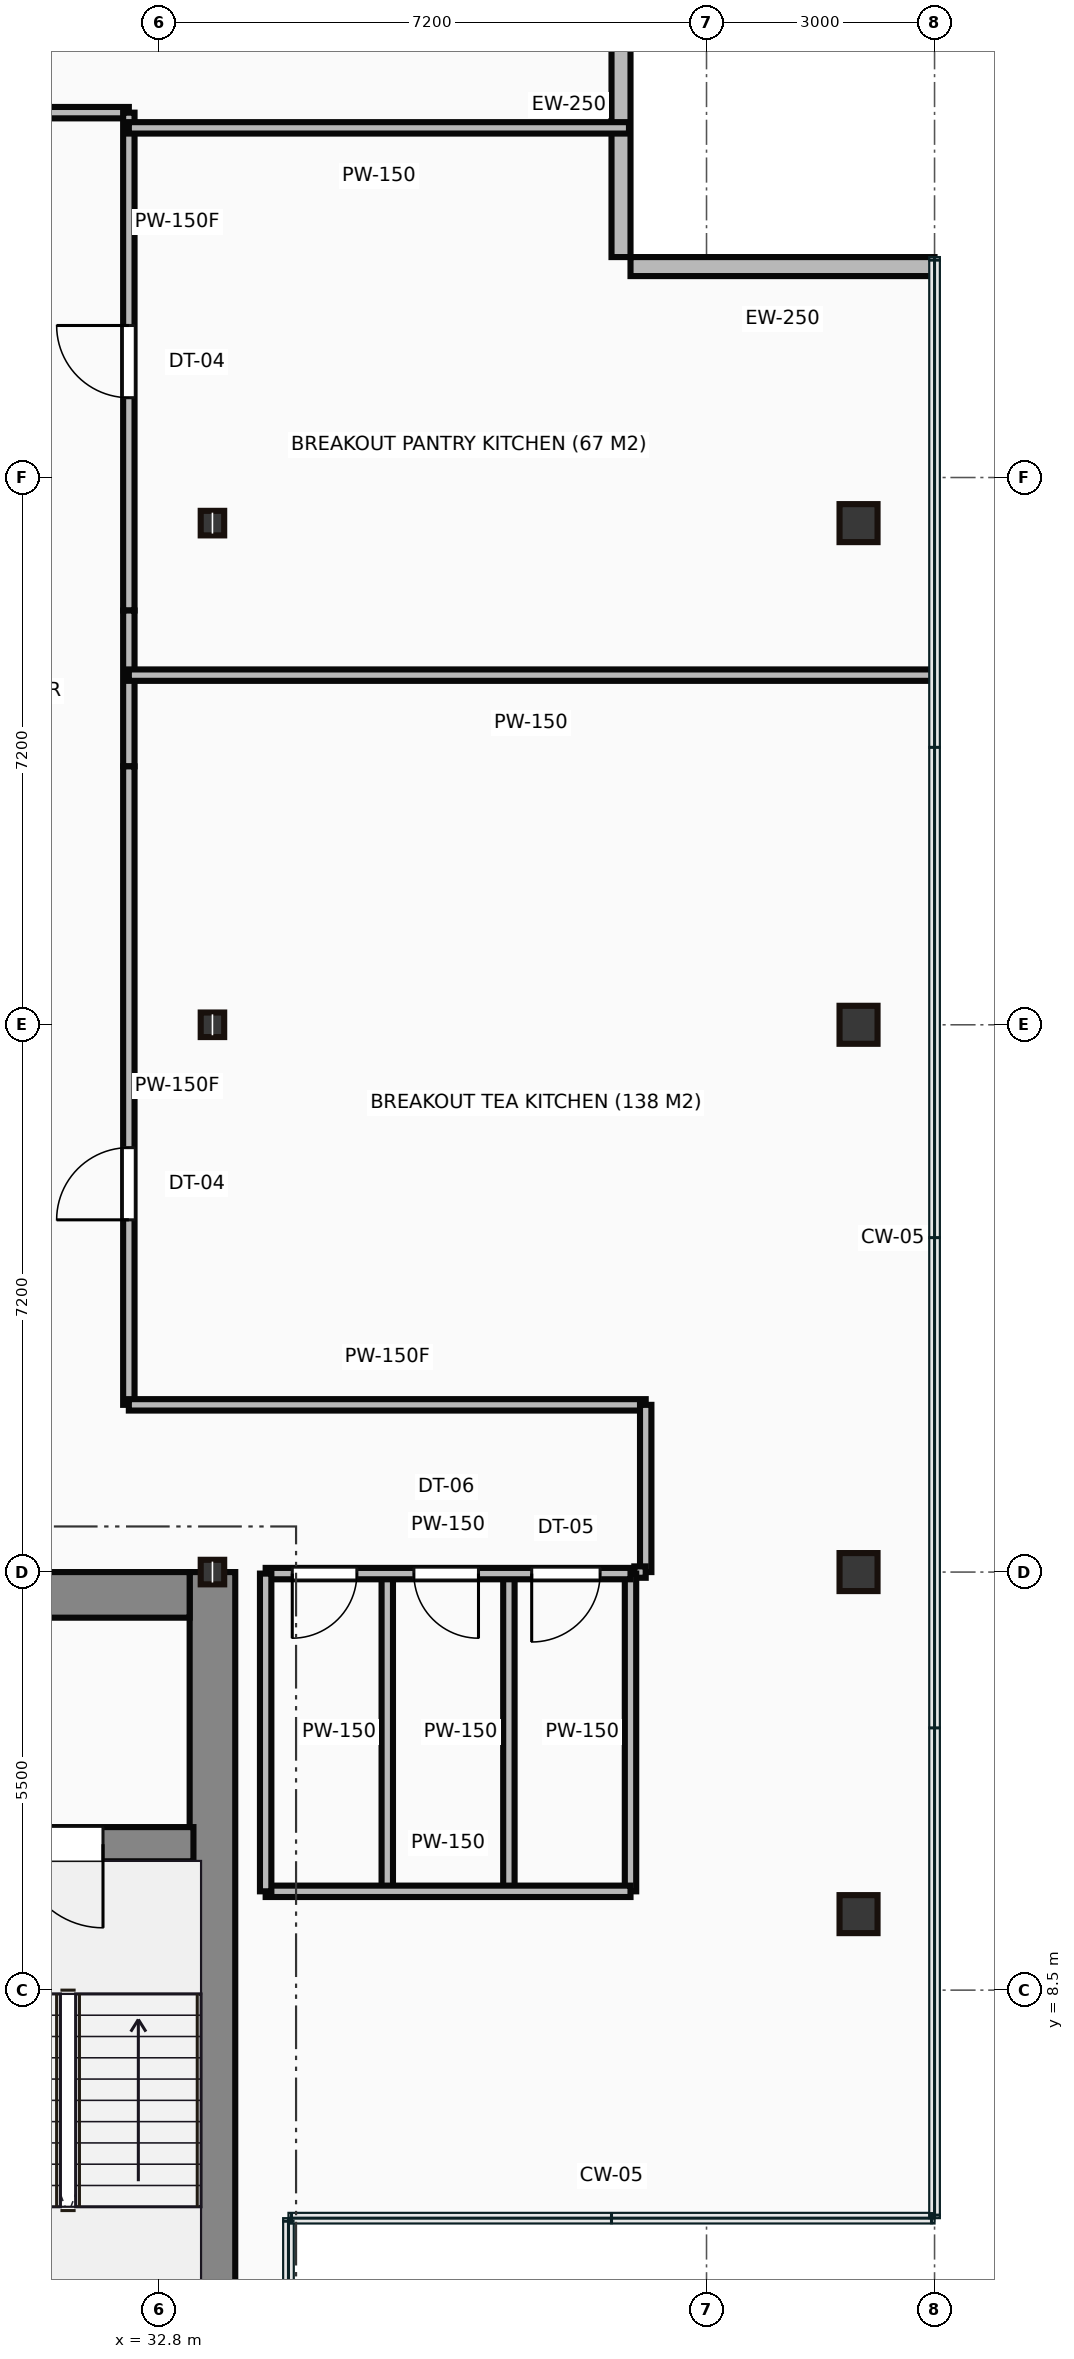
"""IFC4 building model, lengths in metres.
Left out: names, types, materials, properties, quantities, classifications, styles, units other than length and angle.
Written with IfcOpenShell. Run it as: python <this file> out.ifc"""

import sys

from ifc_helpers import new_model, si_unit, direction, frame, frame_2d, origin, origin_2d, place, context, subcontext, project, spatial, rectangle, hollow_rectangle, i_section, extrude, source, transform, mapped, element, fill, save


model = new_model("IFC4")
c1 = context("Model", 3, precision=1e-05, world=origin(), true_north=direction((0.0, 1.0)))
c2 = subcontext(c1, "Body", "Model", "MODEL_VIEW")
j1 = project(units=[si_unit("LENGTHUNIT", "METRE"), si_unit("PLANEANGLEUNIT", "RADIAN")], contexts=[c1])
p1 = place(None, origin())
s1 = spatial("IfcSite", under=j1, at=p1, CompositionType="ELEMENT")
p2 = place(p1, origin())
s2 = spatial("IfcBuilding", under=s1, at=p2, CompositionType="ELEMENT")
p3 = place(p2, frame((0.0, 0.0, 221.45)))
s3 = spatial("IfcBuildingStorey", under=s2, at=p3, CompositionType="ELEMENT", Elevation=221.45)
m1 = source(origin(), c2, "Body", "SweptSolid", [
    extrude(rectangle(XDim=13.1, YDim=0.6, at=frame_2d((6.55, 0.0))), origin(), (0.0, 0.0, 1.0), 3.65),
])
p4 = place(p3, frame((33.5, 0.9, 0.0), z_axis=(0.0, 0.0, 1.0), x_axis=(0.0, 1.0, 0.0)))
e1 = element("IfcWall", 1, at=p4, inside=s3, PredefinedType="SHEAR", context=c2, shape_type="MappedRepresentation", body=[
    mapped(m1, transform((0.0, 0.0, 0.0))),
])
m2 = source(origin(), c2, "Body", "SweptSolid", [
    extrude(rectangle(XDim=12.6, YDim=0.6, at=frame_2d((6.3, 0.0))), origin(), (0.0, 0.0, 1.0), 3.65),
])
p5 = place(p3, frame((20.6, 13.7, 0.0), z_axis=(0.0, 0.0, 1.0), x_axis=(1.0, 0.0, 0.0)))
e2 = element("IfcWall", 2, at=p5, inside=s3, PredefinedType="SHEAR", context=c2, shape_type="MappedRepresentation", body=[
    mapped(m2, transform((0.0, 0.0, 0.0))),
])
p6 = place(p5, frame((9.25, 0.0, 0.0)))
e3 = element("IfcOpeningElement", 3, at=p6, cuts=e2, PredefinedType="OPENING", context=c2, shape_type="SweptSolid", body=[
    extrude(rectangle(XDim=1.1, YDim=2.15, at=frame_2d((0.55, 1.075))), frame((0.0, 0.31, 0.0), z_axis=(0.0, -1.0, 0.0), x_axis=(1.0, 0.0, 0.0)), (0.0, 0.0, 1.0), 0.62),
])
m3 = source(origin(), c2, "Body", "SweptSolid", [
    extrude(rectangle(XDim=3.39, YDim=0.45, at=frame_2d((1.695, 0.0))), origin(), (0.0, 0.0, 1.0), 3.65),
])
p7 = place(p3, frame((29.86, 10.42, 0.0), z_axis=(0.0, 0.0, 1.0), x_axis=(1.0, 0.0, 0.0)))
e4 = element("IfcWall", 4, at=p7, inside=s3, PredefinedType="SHEAR", context=c2, shape_type="MappedRepresentation", body=[
    mapped(m3, transform((0.0, 0.0, 0.0))),
])
p8 = place(p7, frame((1.1, 0.0, 0.0)))
e5 = element("IfcOpeningElement", 5, at=p8, cuts=e4, PredefinedType="OPENING", context=c2, shape_type="SweptSolid", body=[
    extrude(rectangle(XDim=1.1, YDim=2.15, at=frame_2d((0.55, 1.075))), frame((0.0, 0.235, 0.0), z_axis=(0.0, -1.0, 0.0), x_axis=(1.0, 0.0, 0.0)), (0.0, 0.0, 1.0), 0.47),
])
m4 = source(origin(), c2, "Body", "SweptSolid", [
    extrude(i_section(OverallWidth=0.309, OverallDepth=0.323, WebThickness=0.014, FlangeThickness=0.023, at=origin_2d()), origin(), (0.0, 0.0, 1.0), 3.65),
])
for number, where, z_axis, x_axis in (
    (6, (33.5, 14.0, 0.0), (0.0, 0.0, 1.0), (1.0, 0.0, 0.0)),
    (7, (33.5, 21.2, 0.0), (0.0, 0.0, 1.0), (1.0, 0.0, 0.0)),
    (8, (33.5, 27.8, 0.0), (0.0, 0.0, 1.0), (1.0, 0.0, 0.0)),
):
    element("IfcColumn", number, at=place(p3, frame(where, z_axis=z_axis, x_axis=x_axis)), inside=s3, PredefinedType="COLUMN", context=c2, shape_type="MappedRepresentation", body=[
        mapped(m4, transform((0.0, 0.0, 0.0))),
    ])
m5 = source(origin(), c2, "Body", "SweptSolid", [
    extrude(hollow_rectangle(XDim=0.5, YDim=0.5, WallThickness=0.022, at=origin_2d()), origin(), (0.0, 0.0, 1.0), 3.65),
])
for number, where, z_axis, x_axis in (
    (9, (42.0, 9.5, 0.0), (0.0, 0.0, 1.0), (1.0, 0.0, 0.0)),
    (10, (42.0, 14.0, 0.0), (0.0, 0.0, 1.0), (1.0, 0.0, 0.0)),
    (11, (42.0, 21.2, 0.0), (0.0, 0.0, 1.0), (1.0, 0.0, 0.0)),
    (12, (42.0, 27.8, 0.0), (0.0, 0.0, 1.0), (1.0, 0.0, 0.0)),
):
    element("IfcColumn", number, at=place(p3, frame(where, z_axis=z_axis, x_axis=x_axis)), inside=s3, PredefinedType="COLUMN", context=c2, shape_type="MappedRepresentation", body=[
        mapped(m5, transform((0.0, 0.0, 0.0))),
    ])
m6 = source(origin(), c2, "Body", "SweptSolid", [
    extrude(rectangle(XDim=4.0, YDim=0.25, at=frame_2d((2.0, 0.0))), origin(), (0.0, 0.0, 1.0), 3.4),
])
for number, where, z_axis, x_axis in (
    (13, (43.0, 31.175, 0.0), (0.0, 0.0, 1.0), (-1.0, 0.0, 0.0)),
    (14, (38.875, 31.3, 0.0), (0.0, 0.0, 1.0), (0.0, 1.0, 0.0)),
):
    element("IfcWall", number, at=place(p3, frame(where, z_axis=z_axis, x_axis=x_axis)), inside=s3, PredefinedType="STANDARD", context=c2, shape_type="MappedRepresentation", body=[
        mapped(m6, transform((0.0, 0.0, 0.0))),
    ])
m7 = source(origin(), c2, "Body", "SweptSolid", [
    extrude(rectangle(XDim=4.8, YDim=0.15, at=frame_2d((2.4, 0.0))), origin(), (0.0, 0.0, 1.0), 2.787),
])
p9 = place(p3, frame((34.2, 13.98, 0.0), z_axis=(0.0, 0.0, 1.0), x_axis=(1.0, 0.0, 0.0)))
e15 = element("IfcWall", 15, at=p9, inside=s3, PredefinedType="PARTITIONING", context=c2, shape_type="MappedRepresentation", body=[
    mapped(m7, transform((0.0, 0.0, 0.0))),
])
p10 = place(p9, frame((0.35, 0.0, 0.0)))
e16 = element("IfcOpeningElement", 16, at=p10, cuts=e15, PredefinedType="OPENING", context=c2, shape_type="SweptSolid", body=[
    extrude(rectangle(XDim=0.85, YDim=2.1, at=frame_2d((0.425, 1.05))), frame((0.0, 0.085, 0.0), z_axis=(0.0, -1.0, 0.0), x_axis=(1.0, 0.0, 0.0)), (0.0, 0.0, 1.0), 0.17),
])
p11 = place(p9, frame((1.95, 0.0, 0.0)))
e17 = element("IfcOpeningElement", 17, at=p11, cuts=e15, PredefinedType="OPENING", context=c2, shape_type="SweptSolid", body=[
    extrude(rectangle(XDim=0.85, YDim=2.1, at=frame_2d((0.425, 1.05))), frame((0.0, 0.085, 0.0), z_axis=(0.0, -1.0, 0.0), x_axis=(1.0, 0.0, 0.0)), (0.0, 0.0, 1.0), 0.17),
])
p12 = place(p9, frame((3.5, 0.0, 0.0)))
e18 = element("IfcOpeningElement", 18, at=p12, cuts=e15, PredefinedType="OPENING", context=c2, shape_type="SweptSolid", body=[
    extrude(rectangle(XDim=0.9, YDim=2.1, at=frame_2d((0.45, 1.05))), frame((0.0, 0.085, 0.0), z_axis=(0.0, -1.0, 0.0), x_axis=(1.0, 0.0, 0.0)), (0.0, 0.0, 1.0), 0.17),
])
m8 = source(origin(), c2, "Body", "SweptSolid", [
    extrude(rectangle(XDim=4.8, YDim=0.15, at=frame_2d((2.4, 0.0))), origin(), (0.0, 0.0, 1.0), 3.4),
])
p13 = place(p3, frame((34.2, 9.8, 0.0), z_axis=(0.0, 0.0, 1.0), x_axis=(1.0, 0.0, 0.0)))
e19 = element("IfcWall", 19, at=p13, inside=s3, PredefinedType="PARTITIONING", context=c2, shape_type="MappedRepresentation", body=[
    mapped(m8, transform((0.0, 0.0, 0.0))),
])
m9 = source(origin(), c2, "Body", "SweptSolid", [
    extrude(rectangle(XDim=4.18, YDim=0.15, at=frame_2d((2.09, 0.0))), origin(), (0.0, 0.0, 1.0), 3.4),
])
for number, where, z_axis, x_axis in (
    (20, (39.0, 9.8, 0.0), (0.0, 0.0, 1.0), (0.0, 1.0, 0.0)),
    (21, (34.2, 9.8, 0.0), (0.0, 0.0, 1.0), (0.0, 1.0, 0.0)),
    (22, (35.8, 9.8, 0.0), (0.0, 0.0, 1.0), (0.0, 1.0, 0.0)),
    (23, (37.4, 9.8, 0.0), (0.0, 0.0, 1.0), (0.0, 1.0, 0.0)),
):
    element("IfcWall", number, at=place(p3, frame(where, z_axis=z_axis, x_axis=x_axis)), inside=s3, PredefinedType="PARTITIONING", context=c2, shape_type="MappedRepresentation", body=[
        mapped(m9, transform((0.0, 0.0, 0.0))),
    ])
m10 = source(origin(), c2, "Body", "SweptSolid", [
    extrude(rectangle(XDim=2.2, YDim=0.15, at=frame_2d((1.1, 0.0))), origin(), (0.0, 0.0, 1.0), 3.4),
])
p14 = place(p3, frame((30.2, 33.2, 0.0), z_axis=(0.0, 0.0, 1.0), x_axis=(1.0, 0.0, 0.0)))
e24 = element("IfcWall", 24, at=p14, inside=s3, PredefinedType="PARTITIONING", context=c2, shape_type="MappedRepresentation", body=[
    mapped(m10, transform((0.0, 0.0, 0.0))),
])
m11 = source(origin(), c2, "Body", "SweptSolid", [
    extrude(rectangle(XDim=6.55, YDim=0.15, at=frame_2d((3.275, 0.0))), origin(), (0.0, 0.0, 1.0), 3.4),
])
p15 = place(p3, frame((32.4, 33.2, 0.0), z_axis=(0.0, 0.0, 1.0), x_axis=(0.0, -1.0, 0.0)))
e25 = element("IfcWall", 25, at=p15, inside=s3, PredefinedType="PARTITIONING", context=c2, shape_type="MappedRepresentation", body=[
    mapped(m11, transform((0.0, 0.0, 0.0))),
])
p16 = place(p15, frame((2.8, 0.0, 0.0)))
e26 = element("IfcOpeningElement", 26, at=p16, cuts=e25, PredefinedType="OPENING", context=c2, shape_type="SweptSolid", body=[
    extrude(rectangle(XDim=0.95, YDim=2.15, at=frame_2d((0.475, 1.075))), frame((0.0, 0.085, 0.0), z_axis=(0.0, -1.0, 0.0), x_axis=(1.0, 0.0, 0.0)), (0.0, 0.0, 1.0), 0.17),
])
m12 = source(origin(), c2, "Body", "SweptSolid", [
    extrude(rectangle(XDim=2.05, YDim=0.15, at=frame_2d((1.025, 0.0))), origin(), (0.0, 0.0, 1.0), 3.4),
])
p17 = place(p3, frame((32.4, 26.65, 0.0), z_axis=(0.0, 0.0, 1.0), x_axis=(0.0, -1.0, 0.0)))
e27 = element("IfcWall", 27, at=p17, inside=s3, PredefinedType="PARTITIONING", context=c2, shape_type="MappedRepresentation", body=[
    mapped(m12, transform((0.0, 0.0, 0.0))),
])
m13 = source(origin(), c2, "Body", "SweptSolid", [
    extrude(rectangle(XDim=8.4, YDim=0.15, at=frame_2d((4.2, 0.0))), origin(), (0.0, 0.0, 1.0), 3.4),
])
p18 = place(p3, frame((32.4, 24.6, 0.0), z_axis=(0.0, 0.0, 1.0), x_axis=(0.0, -1.0, 0.0)))
e28 = element("IfcWall", 28, at=p18, inside=s3, PredefinedType="PARTITIONING", context=c2, shape_type="MappedRepresentation", body=[
    mapped(m13, transform((0.0, 0.0, 0.0))),
])
p19 = place(p18, frame((5.016, 0.0, 0.0)))
e29 = element("IfcOpeningElement", 29, at=p19, cuts=e28, PredefinedType="OPENING", context=c2, shape_type="SweptSolid", body=[
    extrude(rectangle(XDim=0.95, YDim=2.15, at=frame_2d((0.475, 1.075))), frame((0.0, 0.085, 0.0), z_axis=(0.0, -1.0, 0.0), x_axis=(1.0, 0.0, 0.0)), (0.0, 0.0, 1.0), 0.17),
])
m14 = source(origin(), c2, "Body", "SweptSolid", [
    extrude(rectangle(XDim=6.8, YDim=0.15, at=frame_2d((3.4, 0.0))), origin(), (0.0, 0.0, 1.0), 3.4),
])
p20 = place(p3, frame((32.4, 16.2, 0.0), z_axis=(0.0, 0.0, 1.0), x_axis=(1.0, 0.0, 0.0)))
e30 = element("IfcWall", 30, at=p20, inside=s3, PredefinedType="PARTITIONING", context=c2, shape_type="MappedRepresentation", body=[
    mapped(m14, transform((0.0, 0.0, 0.0))),
])
p21 = place(p3, frame((39.2, 16.2, 0.0), z_axis=(0.0, 0.0, 1.0), x_axis=(0.0, -1.0, 0.0)))
e31 = element("IfcWall", 31, at=p21, inside=s3, PredefinedType="PARTITIONING", context=c2, shape_type="MappedRepresentation", body=[
    mapped(m10, transform((0.0, 0.0, 0.0))),
])
m15 = source(origin(), c2, "Body", "SweptSolid", [
    extrude(rectangle(XDim=0.15, YDim=0.15, at=frame_2d((0.075, 0.0))), origin(), (0.0, 0.0, 1.0), 3.4),
])
p22 = place(p3, frame((39.2, 14.0, 0.0), z_axis=(0.0, 0.0, 1.0), x_axis=(-1.0, 0.0, 0.0)))
e32 = element("IfcWall", 32, at=p22, inside=s3, PredefinedType="PARTITIONING", context=c2, shape_type="MappedRepresentation", body=[
    mapped(m15, transform((0.0, 0.0, 0.0))),
])
m16 = source(origin(), c2, "Body", "SweptSolid", [
    extrude(rectangle(XDim=10.58, YDim=0.15, at=frame_2d((5.29, 0.0))), origin(), (0.0, 0.0, 1.0), 3.4),
])
p23 = place(p3, frame((42.98, 25.8, 0.0), z_axis=(0.0, 0.0, 1.0), x_axis=(-1.0, 0.0, 0.0)))
e33 = element("IfcWall", 33, at=p23, inside=s3, PredefinedType="PARTITIONING", context=c2, shape_type="MappedRepresentation", body=[
    mapped(m16, transform((0.0, 0.0, 0.0))),
])
m17 = source(origin(), c2, "Body", "SweptSolid", [
    extrude(rectangle(XDim=6.58, YDim=0.15, at=frame_2d((3.29, 0.0))), origin(), (0.0, 0.0, 1.0), 3.4),
])
p24 = place(p3, frame((38.98, 33.0, 0.0), z_axis=(0.0, 0.0, 1.0), x_axis=(-1.0, 0.0, 0.0)))
e34 = element("IfcWall", 34, at=p24, inside=s3, PredefinedType="PARTITIONING", context=c2, shape_type="MappedRepresentation", body=[
    mapped(m17, transform((0.0, 0.0, 0.0))),
])
m18 = source(origin(), c2, "Body", "SweptSolid", [
    extrude(rectangle(XDim=1.1, YDim=2.15, at=frame_2d((0.55, 1.075))), frame((0.0, 0.025, 0.0), z_axis=(0.0, -1.0, 0.0), x_axis=(1.0, 0.0, 0.0)), (0.0, 0.0, 1.0), 0.05),
])
p25 = place(p8, frame((1.1, 0.0, 0.0), z_axis=(0.0, 0.0, 1.0), x_axis=(-1.0, 0.0, 0.0)))
e35 = element("IfcDoor", 35, at=p25, inside=s3, OperationType="SINGLE_SWING_RIGHT", PredefinedType="DOOR", context=c2, shape_type="MappedRepresentation", body=[
    mapped(m18, transform((0.0, 0.0, 0.0))),
])
fill(e5, e35)
m19 = source(origin(), c2, "Body", "SweptSolid", [
    extrude(rectangle(XDim=0.85, YDim=2.1, at=frame_2d((0.425, 1.05))), frame((0.0, 0.025, 0.0), z_axis=(0.0, -1.0, 0.0), x_axis=(1.0, 0.0, 0.0)), (0.0, 0.0, 1.0), 0.05),
])
p26 = place(p10, frame((0.85, 0.0, 0.0), z_axis=(0.0, 0.0, 1.0), x_axis=(-1.0, 0.0, 0.0)))
e36 = element("IfcDoor", 36, at=p26, inside=s3, OperationType="SINGLE_SWING_LEFT", PredefinedType="DOOR", context=c2, shape_type="MappedRepresentation", body=[
    mapped(m19, transform((0.0, 0.0, 0.0))),
])
fill(e16, e36)
p27 = place(p11, frame((0.85, 0.0, 0.0), z_axis=(0.0, 0.0, 1.0), x_axis=(-1.0, 0.0, 0.0)))
e37 = element("IfcDoor", 37, at=p27, inside=s3, OperationType="SINGLE_SWING_RIGHT", PredefinedType="DOOR", context=c2, shape_type="MappedRepresentation", body=[
    mapped(m19, transform((0.0, 0.0, 0.0))),
])
fill(e17, e37)
m20 = source(origin(), c2, "Body", "SweptSolid", [
    extrude(rectangle(XDim=0.9, YDim=2.1, at=frame_2d((0.45, 1.05))), frame((0.0, 0.025, 0.0), z_axis=(0.0, -1.0, 0.0), x_axis=(1.0, 0.0, 0.0)), (0.0, 0.0, 1.0), 0.05),
])
p28 = place(p12, frame((0.9, 0.0, 0.0), z_axis=(0.0, 0.0, 1.0), x_axis=(-1.0, 0.0, 0.0)))
e38 = element("IfcDoor", 38, at=p28, inside=s3, OperationType="SINGLE_SWING_LEFT", PredefinedType="DOOR", context=c2, shape_type="MappedRepresentation", body=[
    mapped(m20, transform((0.0, 0.0, 0.0))),
])
fill(e18, e38)
m21 = source(origin(), c2, "Body", "SweptSolid", [
    extrude(rectangle(XDim=0.95, YDim=2.15, at=frame_2d((0.475, 1.075))), frame((0.0, 0.025, 0.0), z_axis=(0.0, -1.0, 0.0), x_axis=(1.0, 0.0, 0.0)), (0.0, 0.0, 1.0), 0.05),
])
p29 = place(p16, origin())
e39 = element("IfcDoor", 39, at=p29, inside=s3, OperationType="SINGLE_SWING_LEFT", PredefinedType="DOOR", context=c2, shape_type="MappedRepresentation", body=[
    mapped(m21, transform((0.0, 0.0, 0.0))),
])
fill(e26, e39)
p30 = place(p19, origin())
e40 = element("IfcDoor", 40, at=p30, inside=s3, OperationType="SINGLE_SWING_RIGHT", PredefinedType="DOOR", context=c2, shape_type="MappedRepresentation", body=[
    mapped(m21, transform((0.0, 0.0, 0.0))),
])
fill(e29, e40)
save(model, sys.argv[1])
